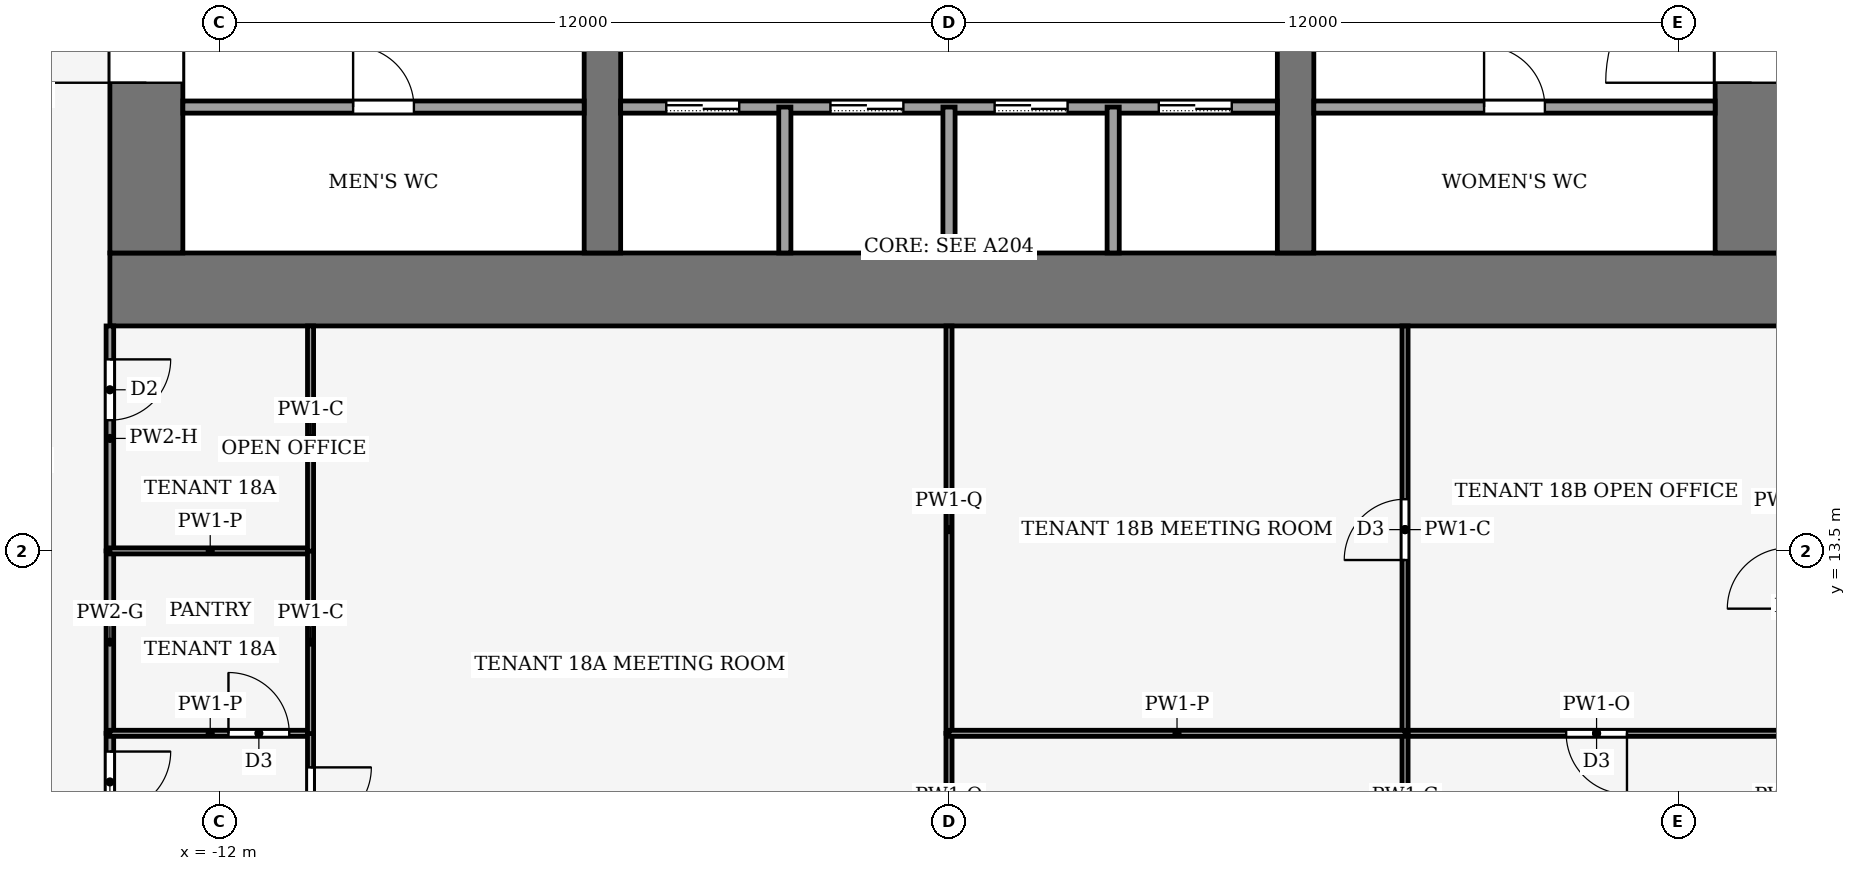
"""IFC4 building model, lengths in metres.
Left out: names, types, materials, properties, quantities, classifications, styles, units other than length and angle.
Written with IfcOpenShell. Run it as: python <this file> out.ifc"""

import sys

from ifc_helpers import new_model, si_unit, direction, frame, frame_2d, origin, place, context, subcontext, project, spatial, rectangle, extrude, element, fill, save


model = new_model("IFC4")
c1 = context("Model", 3, precision=1e-05, world=origin(), true_north=direction((0.0, 1.0)))
c2 = subcontext(c1, "Body", "Model", "MODEL_VIEW")
j1 = project(units=[si_unit("LENGTHUNIT", "METRE"), si_unit("PLANEANGLEUNIT", "RADIAN")], contexts=[c1])
p1 = place(None, origin())
s1 = spatial("IfcSite", under=j1, at=p1, CompositionType="ELEMENT")
p2 = place(p1, origin())
s2 = spatial("IfcBuilding", under=s1, at=p2, CompositionType="ELEMENT")
p3 = place(p2, frame((0.0, 0.0, 82.0)))
s3 = spatial("IfcBuildingStorey", under=s2, at=p3, CompositionType="ELEMENT", Elevation=82.0)
p4 = place(p3, frame((-13.8, 17.8, -0.13), z_axis=(0.0, 0.0, 1.0), x_axis=(1.0, 0.0, 0.0)))
e1 = element("IfcWall", 1, at=p4, inside=s3, PredefinedType="SHEAR", context=c2, shape_type="SweptSolid", body=[
    extrude(rectangle(XDim=27.6, YDim=1.2, at=frame_2d((13.8, 0.0))), origin(), (0.0, 0.0, 1.0), 4.0),
])
p5 = place(p3, frame((-13.2, 18.4, -0.13), z_axis=(0.0, 0.0, 1.0), x_axis=(0.0, 1.0, 0.0)))
e2 = element("IfcWall", 2, at=p5, inside=s3, PredefinedType="SHEAR", context=c2, shape_type="SweptSolid", body=[
    extrude(rectangle(XDim=19.2, YDim=1.2, at=frame_2d((9.6, 0.0))), origin(), (0.0, 0.0, 1.0), 4.0),
])
p6 = place(p5, frame((2.8, 0.0, 0.13)))
e3 = element("IfcOpeningElement", 3, at=p6, cuts=e2, PredefinedType="OPENING", context=c2, shape_type="SweptSolid", body=[
    extrude(rectangle(XDim=2.4, YDim=2.4, at=frame_2d((1.2, 1.2))), frame((0.0, 0.61, 0.0), z_axis=(0.0, -1.0, 0.0), x_axis=(1.0, 0.0, 0.0)), (0.0, 0.0, 1.0), 1.22),
])
p7 = place(p5, frame((13.4, 0.0, 0.13)))
e4 = element("IfcOpeningElement", 4, at=p7, cuts=e2, PredefinedType="OPENING", context=c2, shape_type="SweptSolid", body=[
    extrude(rectangle(XDim=1.4, YDim=2.2, at=frame_2d((0.7, 1.1))), frame((0.0, 0.61, 0.0), z_axis=(0.0, -1.0, 0.0), x_axis=(1.0, 0.0, 0.0)), (0.0, 0.0, 1.0), 1.22),
])
p8 = place(p3, frame((13.2, 18.4, -0.13), z_axis=(0.0, 0.0, 1.0), x_axis=(0.0, 1.0, 0.0)))
e5 = element("IfcWall", 5, at=p8, inside=s3, PredefinedType="SHEAR", context=c2, shape_type="SweptSolid", body=[
    extrude(rectangle(XDim=19.2, YDim=1.2, at=frame_2d((9.6, 0.0))), origin(), (0.0, 0.0, 1.0), 4.0),
])
p9 = place(p8, frame((2.8, 0.0, 0.13)))
e6 = element("IfcOpeningElement", 6, at=p9, cuts=e5, PredefinedType="OPENING", context=c2, shape_type="SweptSolid", body=[
    extrude(rectangle(XDim=2.4, YDim=2.4, at=frame_2d((1.2, 1.2))), frame((0.0, 0.61, 0.0), z_axis=(0.0, -1.0, 0.0), x_axis=(1.0, 0.0, 0.0)), (0.0, 0.0, 1.0), 1.22),
])
p10 = place(p8, frame((13.3, 0.0, 0.13)))
e7 = element("IfcOpeningElement", 7, at=p10, cuts=e5, PredefinedType="OPENING", context=c2, shape_type="SweptSolid", body=[
    extrude(rectangle(XDim=2.4, YDim=2.4, at=frame_2d((1.2, 1.2))), frame((0.0, 0.61, 0.0), z_axis=(0.0, -1.0, 0.0), x_axis=(1.0, 0.0, 0.0)), (0.0, 0.0, 1.0), 1.22),
])
p11 = place(p3, frame((-5.7, 18.4, -0.13), z_axis=(0.0, 0.0, 1.0), x_axis=(0.0, 1.0, 0.0)))
e8 = element("IfcWall", 8, at=p11, inside=s3, PredefinedType="SHEAR", context=c2, shape_type="SweptSolid", body=[
    extrude(rectangle(XDim=19.2, YDim=0.6, at=frame_2d((9.6, 0.0))), origin(), (0.0, 0.0, 1.0), 4.0),
])
p12 = place(p11, frame((8.35, 0.0, 0.13)))
e9 = element("IfcOpeningElement", 9, at=p12, cuts=e8, PredefinedType="OPENING", context=c2, shape_type="SweptSolid", body=[
    extrude(rectangle(XDim=0.9, YDim=2.1, at=frame_2d((0.45, 1.05))), frame((0.0, 0.31, 0.0), z_axis=(0.0, -1.0, 0.0), x_axis=(1.0, 0.0, 0.0)), (0.0, 0.0, 1.0), 0.62),
])
p13 = place(p3, frame((5.7, 18.4, -0.13), z_axis=(0.0, 0.0, 1.0), x_axis=(0.0, 1.0, 0.0)))
e10 = element("IfcWall", 10, at=p13, inside=s3, PredefinedType="SHEAR", context=c2, shape_type="SweptSolid", body=[
    extrude(rectangle(XDim=19.2, YDim=0.6, at=frame_2d((9.6, 0.0))), origin(), (0.0, 0.0, 1.0), 4.0),
])
p14 = place(p13, frame((13.3, 0.0, 0.13)))
e11 = element("IfcOpeningElement", 11, at=p14, cuts=e10, PredefinedType="OPENING", context=c2, shape_type="SweptSolid", body=[
    extrude(rectangle(XDim=2.4, YDim=2.4, at=frame_2d((1.2, 1.2))), frame((0.0, 0.31, 0.0), z_axis=(0.0, -1.0, 0.0), x_axis=(1.0, 0.0, 0.0)), (0.0, 0.0, 1.0), 0.62),
])
p15 = place(p3, frame((-12.6, 20.8, 0.0), z_axis=(0.0, 0.0, 1.0), x_axis=(1.0, 0.0, 0.0)))
e12 = element("IfcWall", 12, at=p15, inside=s3, PredefinedType="PARTITIONING", context=c2, shape_type="SweptSolid", body=[
    extrude(rectangle(XDim=6.6, YDim=0.2, at=frame_2d((3.3, 0.0))), origin(), (0.0, 0.0, 1.0), 3.87),
])
p16 = place(p15, frame((2.8, 0.0, 0.0)))
e13 = element("IfcOpeningElement", 13, at=p16, cuts=e12, PredefinedType="OPENING", context=c2, shape_type="SweptSolid", body=[
    extrude(rectangle(XDim=1.0, YDim=2.1, at=frame_2d((0.5, 1.05))), frame((0.0, 0.11, 0.0), z_axis=(0.0, -1.0, 0.0), x_axis=(1.0, 0.0, 0.0)), (0.0, 0.0, 1.0), 0.22),
])
p17 = place(p3, frame((-5.4, 20.8, 0.0), z_axis=(0.0, 0.0, 1.0), x_axis=(1.0, 0.0, 0.0)))
e14 = element("IfcWall", 14, at=p17, inside=s3, PredefinedType="PARTITIONING", context=c2, shape_type="SweptSolid", body=[
    extrude(rectangle(XDim=10.8, YDim=0.2, at=frame_2d((5.4, 0.0))), origin(), (0.0, 0.0, 1.0), 3.87),
])
p18 = place(p17, frame((0.75, 0.0, 0.0)))
e15 = element("IfcOpeningElement", 15, at=p18, cuts=e14, PredefinedType="OPENING", context=c2, shape_type="SweptSolid", body=[
    extrude(rectangle(XDim=1.2, YDim=2.2, at=frame_2d((0.6, 1.1))), frame((0.0, 0.11, 0.0), z_axis=(0.0, -1.0, 0.0), x_axis=(1.0, 0.0, 0.0)), (0.0, 0.0, 1.0), 0.22),
])
p19 = place(p17, frame((3.45, 0.0, 0.0)))
e16 = element("IfcOpeningElement", 16, at=p19, cuts=e14, PredefinedType="OPENING", context=c2, shape_type="SweptSolid", body=[
    extrude(rectangle(XDim=1.2, YDim=2.2, at=frame_2d((0.6, 1.1))), frame((0.0, 0.11, 0.0), z_axis=(0.0, -1.0, 0.0), x_axis=(1.0, 0.0, 0.0)), (0.0, 0.0, 1.0), 0.22),
])
p20 = place(p17, frame((6.15, 0.0, 0.0)))
e17 = element("IfcOpeningElement", 17, at=p20, cuts=e14, PredefinedType="OPENING", context=c2, shape_type="SweptSolid", body=[
    extrude(rectangle(XDim=1.2, YDim=2.2, at=frame_2d((0.6, 1.1))), frame((0.0, 0.11, 0.0), z_axis=(0.0, -1.0, 0.0), x_axis=(1.0, 0.0, 0.0)), (0.0, 0.0, 1.0), 0.22),
])
p21 = place(p17, frame((8.85, 0.0, 0.0)))
e18 = element("IfcOpeningElement", 18, at=p21, cuts=e14, PredefinedType="OPENING", context=c2, shape_type="SweptSolid", body=[
    extrude(rectangle(XDim=1.2, YDim=2.2, at=frame_2d((0.6, 1.1))), frame((0.0, 0.11, 0.0), z_axis=(0.0, -1.0, 0.0), x_axis=(1.0, 0.0, 0.0)), (0.0, 0.0, 1.0), 0.22),
])
p22 = place(p3, frame((6.0, 20.8, 0.0), z_axis=(0.0, 0.0, 1.0), x_axis=(1.0, 0.0, 0.0)))
e19 = element("IfcWall", 19, at=p22, inside=s3, PredefinedType="PARTITIONING", context=c2, shape_type="SweptSolid", body=[
    extrude(rectangle(XDim=6.6, YDim=0.2, at=frame_2d((3.3, 0.0))), origin(), (0.0, 0.0, 1.0), 3.87),
])
p23 = place(p22, frame((2.8, 0.0, 0.0)))
e20 = element("IfcOpeningElement", 20, at=p23, cuts=e19, PredefinedType="OPENING", context=c2, shape_type="SweptSolid", body=[
    extrude(rectangle(XDim=1.0, YDim=2.1, at=frame_2d((0.5, 1.05))), frame((0.0, 0.11, 0.0), z_axis=(0.0, -1.0, 0.0), x_axis=(1.0, 0.0, 0.0)), (0.0, 0.0, 1.0), 0.22),
])
for number, where, z_axis, x_axis in (
    (21, (-2.7, 18.4, 0.0), (0.0, 0.0, 1.0), (0.0, 1.0, 0.0)),
    (22, (0.0, 18.4, 0.0), (0.0, 0.0, 1.0), (0.0, 1.0, 0.0)),
    (23, (2.7, 18.4, 0.0), (0.0, 0.0, 1.0), (0.0, 1.0, 0.0)),
):
    element("IfcWall", number, at=place(p3, frame(where, z_axis=z_axis, x_axis=x_axis)), inside=s3, PredefinedType="PARTITIONING", context=c2, shape_type="SweptSolid", body=[
        extrude(rectangle(XDim=2.4, YDim=0.2, at=frame_2d((1.2, 0.0))), origin(), (0.0, 0.0, 1.0), 3.87),
    ])
p24 = place(p3, frame((-13.8, 10.5, 0.0), z_axis=(0.0, 0.0, 1.0), x_axis=(0.0, -1.0, 0.0)))
e24 = element("IfcWall", 24, at=p24, inside=s3, PredefinedType="PARTITIONING", context=c2, shape_type="SweptSolid", body=[
    extrude(rectangle(XDim=5.73, YDim=0.125, at=frame_2d((2.865, 0.0))), origin(), (0.0, 0.0, 1.0), 3.04),
])
p25 = place(p24, frame((0.3, 0.0, 0.0)))
e25 = element("IfcOpeningElement", 25, at=p25, cuts=e24, PredefinedType="OPENING", context=c2, shape_type="SweptSolid", body=[
    extrude(rectangle(XDim=1.0, YDim=2.1, at=frame_2d((0.5, 1.05))), frame((0.0, 0.073, 0.0), z_axis=(0.0, -1.0, 0.0), x_axis=(1.0, 0.0, 0.0)), (0.0, 0.0, 1.0), 0.145),
])
p26 = place(p3, frame((-13.8, 10.5, 0.0), z_axis=(0.0, 0.0, 1.0), x_axis=(0.0, 1.0, 0.0)))
e26 = element("IfcWall", 26, at=p26, inside=s3, PredefinedType="PARTITIONING", context=c2, shape_type="SweptSolid", body=[
    extrude(rectangle(XDim=3.0, YDim=0.125, at=frame_2d((1.5, 0.0))), origin(), (0.0, 0.0, 1.0), 3.87),
])
p27 = place(p3, frame((-13.8, 17.2, 0.0), z_axis=(0.0, 0.0, 1.0), x_axis=(0.0, -1.0, 0.0)))
e27 = element("IfcWall", 27, at=p27, inside=s3, PredefinedType="PARTITIONING", context=c2, shape_type="SweptSolid", body=[
    extrude(rectangle(XDim=3.7, YDim=0.125, at=frame_2d((1.85, 0.0))), origin(), (0.0, 0.0, 1.0), 3.14),
])
p28 = place(p27, frame((0.55, 0.0, 0.0)))
e28 = element("IfcOpeningElement", 28, at=p28, cuts=e27, PredefinedType="OPENING", context=c2, shape_type="SweptSolid", body=[
    extrude(rectangle(XDim=1.0, YDim=2.1, at=frame_2d((0.5, 1.05))), frame((0.0, 0.073, 0.0), z_axis=(0.0, -1.0, 0.0), x_axis=(1.0, 0.0, 0.0)), (0.0, 0.0, 1.0), 0.145),
])
p29 = place(p3, frame((-13.8, 10.5, 0.0), z_axis=(0.0, 0.0, 1.0), x_axis=(1.0, 0.0, 0.0)))
e29 = element("IfcWall", 29, at=p29, inside=s3, PredefinedType="PARTITIONING", context=c2, shape_type="SweptSolid", body=[
    extrude(rectangle(XDim=3.3, YDim=0.1, at=frame_2d((1.65, 0.0))), origin(), (0.0, 0.0, 1.0), 3.44),
])
p30 = place(p29, frame((1.95, 0.0, 0.0)))
e30 = element("IfcOpeningElement", 30, at=p30, cuts=e29, PredefinedType="OPENING", context=c2, shape_type="SweptSolid", body=[
    extrude(rectangle(XDim=1.0, YDim=2.1, at=frame_2d((0.5, 1.05))), frame((0.0, 0.06, 0.0), z_axis=(0.0, -1.0, 0.0), x_axis=(1.0, 0.0, 0.0)), (0.0, 0.0, 1.0), 0.12),
])
p31 = place(p3, frame((-10.5, 10.504, 0.0), z_axis=(0.0, 0.0, 1.0), x_axis=(0.0, -1.0, 0.0)))
e31 = element("IfcWall", 31, at=p31, inside=s3, PredefinedType="PARTITIONING", context=c2, shape_type="SweptSolid", body=[
    extrude(rectangle(XDim=5.459, YDim=0.1, at=frame_2d((2.729, 0.0))), origin(), (0.0, 0.0, 1.0), 3.04),
])
p32 = place(p31, frame((0.564, 0.0, 0.0)))
e32 = element("IfcOpeningElement", 32, at=p32, cuts=e31, PredefinedType="OPENING", context=c2, shape_type="SweptSolid", body=[
    extrude(rectangle(XDim=1.0, YDim=2.1, at=frame_2d((0.5, 1.05))), frame((0.0, 0.06, 0.0), z_axis=(0.0, -1.0, 0.0), x_axis=(1.0, 0.0, 0.0)), (0.0, 0.0, 1.0), 0.12),
])
p33 = place(p3, frame((-10.5, 13.5, 0.0), z_axis=(0.0, 0.0, 1.0), x_axis=(-1.0, 0.0, 0.0)))
e33 = element("IfcWall", 33, at=p33, inside=s3, PredefinedType="PARTITIONING", context=c2, shape_type="SweptSolid", body=[
    extrude(rectangle(XDim=3.3, YDim=0.1, at=frame_2d((1.65, 0.0))), origin(), (0.0, 0.0, 1.0), 3.44),
])
p34 = place(p3, frame((-10.5, 10.496, 0.0), z_axis=(0.0, 0.0, 1.0), x_axis=(0.0, 1.0, 0.0)))
e34 = element("IfcWall", 34, at=p34, inside=s3, PredefinedType="PARTITIONING", context=c2, shape_type="SweptSolid", body=[
    extrude(rectangle(XDim=3.008, YDim=0.1, at=frame_2d((1.504, 0.0))), origin(), (0.0, 0.0, 1.0), 3.87),
])
p35 = place(p3, frame((-10.5, 13.496, 0.0), z_axis=(0.0, 0.0, 1.0), x_axis=(0.0, 1.0, 0.0)))
e35 = element("IfcWall", 35, at=p35, inside=s3, PredefinedType="PARTITIONING", context=c2, shape_type="SweptSolid", body=[
    extrude(rectangle(XDim=3.704, YDim=0.1, at=frame_2d((1.852, 0.0))), origin(), (0.0, 0.0, 1.0), 3.87),
])
p36 = place(p3, frame((0.0, 7.5, 0.0), z_axis=(0.0, 0.0, 1.0), x_axis=(0.0, 1.0, 0.0)))
e36 = element("IfcWall", 36, at=p36, inside=s3, PredefinedType="PARTITIONING", context=c2, shape_type="SweptSolid", body=[
    extrude(rectangle(XDim=3.0, YDim=0.1, at=frame_2d((1.5, 0.0))), origin(), (0.0, 0.0, 1.0), 3.48),
])
p37 = place(p3, frame((0.0, 10.5, 0.0), z_axis=(0.0, 0.0, 1.0), x_axis=(0.0, 1.0, 0.0)))
e37 = element("IfcWall", 37, at=p37, inside=s3, PredefinedType="PARTITIONING", context=c2, shape_type="SweptSolid", body=[
    extrude(rectangle(XDim=6.7, YDim=0.1, at=frame_2d((3.35, 0.0))), origin(), (0.0, 0.0, 1.0), 3.48),
])
p38 = place(p3, frame((13.8, 10.5, 0.0), z_axis=(0.0, 0.0, 1.0), x_axis=(-1.0, 0.0, 0.0)))
e38 = element("IfcWall", 38, at=p38, inside=s3, PredefinedType="PARTITIONING", context=c2, shape_type="SweptSolid", body=[
    extrude(rectangle(XDim=6.3, YDim=0.1, at=frame_2d((3.15, 0.0))), origin(), (0.0, 0.0, 1.0), 3.39),
])
p39 = place(p38, frame((2.65, 0.0, 0.0)))
e39 = element("IfcOpeningElement", 39, at=p39, cuts=e38, PredefinedType="OPENING", context=c2, shape_type="SweptSolid", body=[
    extrude(rectangle(XDim=1.0, YDim=2.1, at=frame_2d((0.5, 1.05))), frame((0.0, 0.06, 0.0), z_axis=(0.0, -1.0, 0.0), x_axis=(1.0, 0.0, 0.0)), (0.0, 0.0, 1.0), 0.12),
])
p40 = place(p3, frame((7.5, 10.5, 0.0), z_axis=(0.0, 0.0, 1.0), x_axis=(0.0, -1.0, 0.0)))
e40 = element("IfcWall", 40, at=p40, inside=s3, PredefinedType="PARTITIONING", context=c2, shape_type="SweptSolid", body=[
    extrude(rectangle(XDim=3.0, YDim=0.1, at=frame_2d((1.5, 0.0))), origin(), (0.0, 0.0, 1.0), 3.87),
])
p41 = place(p3, frame((7.5, 10.5, 0.0), z_axis=(0.0, 0.0, 1.0), x_axis=(0.0, 1.0, 0.0)))
e41 = element("IfcWall", 41, at=p41, inside=s3, PredefinedType="PARTITIONING", context=c2, shape_type="SweptSolid", body=[
    extrude(rectangle(XDim=6.7, YDim=0.1, at=frame_2d((3.35, 0.0))), origin(), (0.0, 0.0, 1.0), 3.87),
])
p42 = place(p41, frame((2.85, 0.0, 0.0)))
e42 = element("IfcOpeningElement", 42, at=p42, cuts=e41, PredefinedType="OPENING", context=c2, shape_type="SweptSolid", body=[
    extrude(rectangle(XDim=1.0, YDim=2.1, at=frame_2d((0.5, 1.05))), frame((0.0, 0.06, 0.0), z_axis=(0.0, -1.0, 0.0), x_axis=(1.0, 0.0, 0.0)), (0.0, 0.0, 1.0), 0.12),
])
p43 = place(p3, frame((7.5, 10.5, 0.0), z_axis=(0.0, 0.0, 1.0), x_axis=(-1.0, 0.0, 0.0)))
e43 = element("IfcWall", 43, at=p43, inside=s3, PredefinedType="PARTITIONING", context=c2, shape_type="SweptSolid", body=[
    extrude(rectangle(XDim=7.5, YDim=0.1, at=frame_2d((3.75, 0.0))), origin(), (0.0, 0.0, 1.0), 3.44),
])
p44 = place(p18, origin())
e44 = element("IfcDoor", 44, at=p44, inside=s3, OperationType="SLIDING_TO_LEFT", PredefinedType="DOOR", context=c2, shape_type="SweptSolid", body=[
    extrude(rectangle(XDim=1.2, YDim=2.2, at=frame_2d((0.6, 1.1))), frame((0.0, 0.025, 0.0), z_axis=(0.0, -1.0, 0.0), x_axis=(1.0, 0.0, 0.0)), (0.0, 0.0, 1.0), 0.05),
])
fill(e15, e44)
p45 = place(p19, origin())
e45 = element("IfcDoor", 45, at=p45, inside=s3, OperationType="SLIDING_TO_LEFT", PredefinedType="DOOR", context=c2, shape_type="SweptSolid", body=[
    extrude(rectangle(XDim=1.2, YDim=2.2, at=frame_2d((0.6, 1.1))), frame((0.0, 0.025, 0.0), z_axis=(0.0, -1.0, 0.0), x_axis=(1.0, 0.0, 0.0)), (0.0, 0.0, 1.0), 0.05),
])
fill(e16, e45)
p46 = place(p20, origin())
e46 = element("IfcDoor", 46, at=p46, inside=s3, OperationType="SLIDING_TO_LEFT", PredefinedType="DOOR", context=c2, shape_type="SweptSolid", body=[
    extrude(rectangle(XDim=1.2, YDim=2.2, at=frame_2d((0.6, 1.1))), frame((0.0, 0.025, 0.0), z_axis=(0.0, -1.0, 0.0), x_axis=(1.0, 0.0, 0.0)), (0.0, 0.0, 1.0), 0.05),
])
fill(e17, e46)
p47 = place(p21, origin())
e47 = element("IfcDoor", 47, at=p47, inside=s3, OperationType="SLIDING_TO_LEFT", PredefinedType="DOOR", context=c2, shape_type="SweptSolid", body=[
    extrude(rectangle(XDim=1.2, YDim=2.2, at=frame_2d((0.6, 1.1))), frame((0.0, 0.025, 0.0), z_axis=(0.0, -1.0, 0.0), x_axis=(1.0, 0.0, 0.0)), (0.0, 0.0, 1.0), 0.05),
])
fill(e18, e47)
p48 = place(p16, origin())
e48 = element("IfcDoor", 48, at=p48, inside=s3, OperationType="SINGLE_SWING_LEFT", PredefinedType="DOOR", context=c2, shape_type="SweptSolid", body=[
    extrude(rectangle(XDim=1.0, YDim=2.1, at=frame_2d((0.5, 1.05))), frame((0.0, 0.025, 0.0), z_axis=(0.0, -1.0, 0.0), x_axis=(1.0, 0.0, 0.0)), (0.0, 0.0, 1.0), 0.05),
])
fill(e13, e48)
p49 = place(p23, origin())
e49 = element("IfcDoor", 49, at=p49, inside=s3, OperationType="SINGLE_SWING_RIGHT", PredefinedType="DOOR", context=c2, shape_type="SweptSolid", body=[
    extrude(rectangle(XDim=1.0, YDim=2.1, at=frame_2d((0.5, 1.05))), frame((0.0, 0.025, 0.0), z_axis=(0.0, -1.0, 0.0), x_axis=(1.0, 0.0, 0.0)), (0.0, 0.0, 1.0), 0.05),
])
fill(e20, e49)
p50 = place(p6, origin())
e50 = element("IfcDoor", 50, at=p50, inside=s3, OperationType="DOUBLE_DOOR_SINGLE_SWING", PredefinedType="DOOR", context=c2, shape_type="SweptSolid", body=[
    extrude(rectangle(XDim=2.4, YDim=2.4, at=frame_2d((1.2, 1.2))), frame((0.0, 0.025, 0.0), z_axis=(0.0, -1.0, 0.0), x_axis=(1.0, 0.0, 0.0)), (0.0, 0.0, 1.0), 0.05),
])
fill(e3, e50)
p51 = place(p9, origin())
e51 = element("IfcDoor", 51, at=p51, inside=s3, OperationType="DOUBLE_DOOR_SINGLE_SWING", PredefinedType="DOOR", context=c2, shape_type="SweptSolid", body=[
    extrude(rectangle(XDim=2.4, YDim=2.4, at=frame_2d((1.2, 1.2))), frame((0.0, 0.025, 0.0), z_axis=(0.0, -1.0, 0.0), x_axis=(1.0, 0.0, 0.0)), (0.0, 0.0, 1.0), 0.05),
])
fill(e6, e51)
p52 = place(p25, origin())
e52 = element("IfcDoor", 52, at=p52, inside=s3, OperationType="SINGLE_SWING_LEFT", PredefinedType="DOOR", context=c2, shape_type="SweptSolid", body=[
    extrude(rectangle(XDim=1.0, YDim=2.1, at=frame_2d((0.5, 1.05))), frame((0.0, 0.025, 0.0), z_axis=(0.0, -1.0, 0.0), x_axis=(1.0, 0.0, 0.0)), (0.0, 0.0, 1.0), 0.05),
])
fill(e25, e52)
p53 = place(p28, origin())
e53 = element("IfcDoor", 53, at=p53, inside=s3, OperationType="SINGLE_SWING_LEFT", PredefinedType="DOOR", context=c2, shape_type="SweptSolid", body=[
    extrude(rectangle(XDim=1.0, YDim=2.1, at=frame_2d((0.5, 1.05))), frame((0.0, 0.025, 0.0), z_axis=(0.0, -1.0, 0.0), x_axis=(1.0, 0.0, 0.0)), (0.0, 0.0, 1.0), 0.05),
])
fill(e28, e53)
p54 = place(p30, origin())
e54 = element("IfcDoor", 54, at=p54, inside=s3, OperationType="SINGLE_SWING_RIGHT", PredefinedType="DOOR", context=c2, shape_type="SweptSolid", body=[
    extrude(rectangle(XDim=1.0, YDim=2.1, at=frame_2d((0.5, 1.05))), frame((0.0, 0.025, 0.0), z_axis=(0.0, -1.0, 0.0), x_axis=(1.0, 0.0, 0.0)), (0.0, 0.0, 1.0), 0.05),
])
fill(e30, e54)
p55 = place(p32, origin())
e55 = element("IfcDoor", 55, at=p55, inside=s3, OperationType="SINGLE_SWING_LEFT", PredefinedType="DOOR", context=c2, shape_type="SweptSolid", body=[
    extrude(rectangle(XDim=1.0, YDim=2.1, at=frame_2d((0.5, 1.05))), frame((0.0, 0.025, 0.0), z_axis=(0.0, -1.0, 0.0), x_axis=(1.0, 0.0, 0.0)), (0.0, 0.0, 1.0), 0.05),
])
fill(e32, e55)
p56 = place(p39, origin())
e56 = element("IfcDoor", 56, at=p56, inside=s3, OperationType="SINGLE_SWING_RIGHT", PredefinedType="DOOR", context=c2, shape_type="SweptSolid", body=[
    extrude(rectangle(XDim=1.0, YDim=2.1, at=frame_2d((0.5, 1.05))), frame((0.0, 0.025, 0.0), z_axis=(0.0, -1.0, 0.0), x_axis=(1.0, 0.0, 0.0)), (0.0, 0.0, 1.0), 0.05),
])
fill(e39, e56)
p57 = place(p42, origin())
e57 = element("IfcDoor", 57, at=p57, inside=s3, OperationType="SINGLE_SWING_LEFT", PredefinedType="DOOR", context=c2, shape_type="SweptSolid", body=[
    extrude(rectangle(XDim=1.0, YDim=2.1, at=frame_2d((0.5, 1.05))), frame((0.0, 0.025, 0.0), z_axis=(0.0, -1.0, 0.0), x_axis=(1.0, 0.0, 0.0)), (0.0, 0.0, 1.0), 0.05),
])
fill(e42, e57)
save(model, sys.argv[1])
